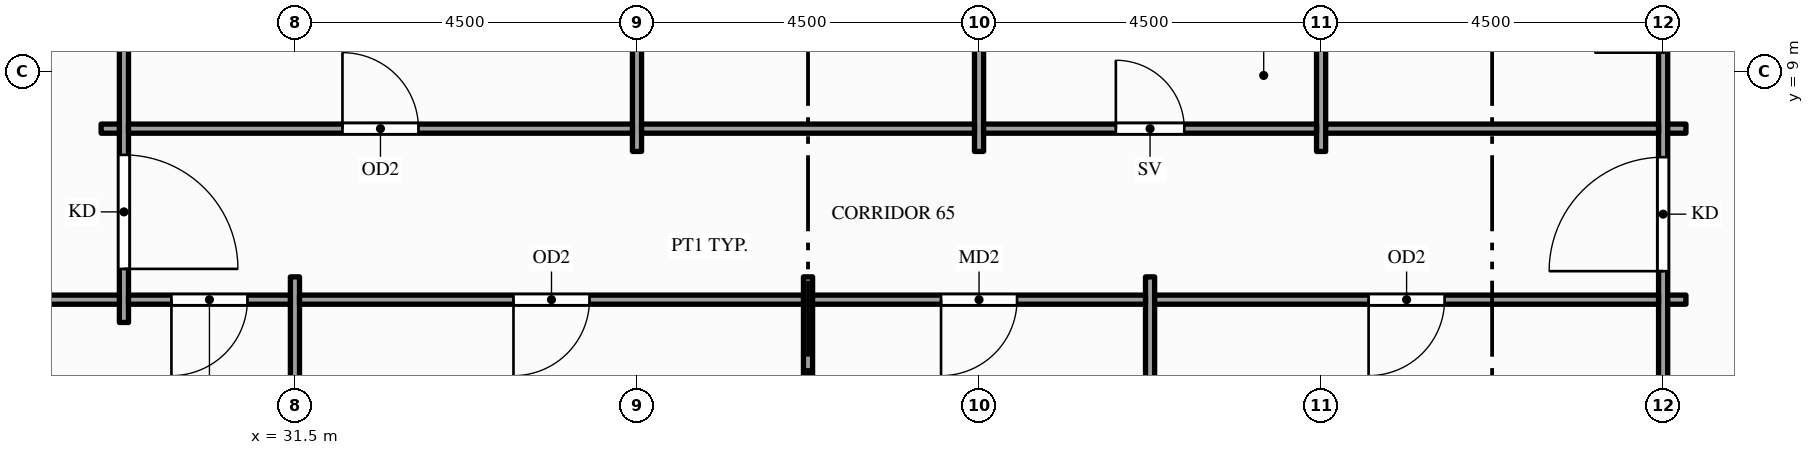
"""IFC4 building model, lengths in metres.
Left out: names, types, materials, properties, quantities, classifications, styles, units other than length and angle.
Written with IfcOpenShell. Run it as: python <this file> out.ifc"""

import sys

from ifc_helpers import new_model, si_unit, direction, frame, frame_2d, origin, place, context, subcontext, project, spatial, rectangle, extrude, element, fill, save


model = new_model("IFC4")
c1 = context("Model", 3, precision=1e-05, world=origin(), true_north=direction((0.0, 1.0)))
c2 = subcontext(c1, "Body", "Model", "MODEL_VIEW")
j1 = project(units=[si_unit("LENGTHUNIT", "METRE"), si_unit("PLANEANGLEUNIT", "RADIAN")], contexts=[c1])
p1 = place(None, origin())
s1 = spatial("IfcSite", under=j1, at=p1, CompositionType="ELEMENT")
p2 = place(p1, origin())
s2 = spatial("IfcBuilding", under=s1, at=p2, CompositionType="ELEMENT")
p3 = place(p2, frame((0.0, 0.0, 179.0)))
s3 = spatial("IfcBuildingStorey", under=s2, at=p3, CompositionType="ELEMENT", Elevation=179.0)
p4 = place(p3, frame((29.25, 5.7, 0.0), z_axis=(0.0, 0.0, 1.0), x_axis=(0.0, 1.0, 0.0)))
e1 = element("IfcWall", 1, at=p4, inside=s3, PredefinedType="PARTITIONING", context=c2, shape_type="SweptSolid", body=[
    extrude(rectangle(XDim=14.1, YDim=0.12, at=frame_2d((7.05, 0.0))), origin(), (0.0, 0.0, 1.0), 2.87),
])
p5 = place(p4, frame((0.705, 0.0, 0.0)))
e2 = element("IfcOpeningElement", 2, at=p5, cuts=e1, PredefinedType="OPENING", context=c2, shape_type="SweptSolid", body=[
    extrude(rectangle(XDim=1.5, YDim=2.1, at=frame_2d((0.75, 1.05))), frame((0.0, 0.07, 0.0), z_axis=(0.0, -1.0, 0.0), x_axis=(1.0, 0.0, 0.0)), (0.0, 0.0, 1.0), 0.14),
])
p6 = place(p4, frame((11.895, 0.0, 0.0)))
e3 = element("IfcOpeningElement", 3, at=p6, cuts=e1, PredefinedType="OPENING", context=c2, shape_type="SweptSolid", body=[
    extrude(rectangle(XDim=1.5, YDim=2.1, at=frame_2d((0.75, 1.05))), frame((0.0, 0.07, 0.0), z_axis=(0.0, -1.0, 0.0), x_axis=(1.0, 0.0, 0.0)), (0.0, 0.0, 1.0), 0.14),
])
p7 = place(p3, frame((31.5, 1.65, 0.0), z_axis=(0.0, 0.0, 1.0), x_axis=(0.0, 1.0, 0.0)))
e4 = element("IfcWall", 4, at=p7, inside=s3, PredefinedType="PARTITIONING", context=c2, shape_type="SweptSolid", body=[
    extrude(rectangle(XDim=4.65, YDim=0.12, at=frame_2d((2.325, 0.0))), origin(), (0.0, 0.0, 1.0), 2.87),
])
p8 = place(p3, frame((36.0, 7.95, 0.0), z_axis=(0.0, 0.0, 1.0), x_axis=(0.0, 1.0, 0.0)))
e5 = element("IfcWall", 5, at=p8, inside=s3, PredefinedType="PARTITIONING", context=c2, shape_type="SweptSolid", body=[
    extrude(rectangle(XDim=9.6, YDim=0.12, at=frame_2d((4.8, 0.0))), origin(), (0.0, 0.0, 1.0), 2.87),
])
p9 = place(p3, frame((38.25, 1.65, 0.0), z_axis=(0.0, 0.0, 1.0), x_axis=(0.0, 1.0, 0.0)))
e6 = element("IfcWall", 6, at=p9, inside=s3, PredefinedType="PARTITIONING", context=c2, shape_type="SweptSolid", body=[
    extrude(rectangle(XDim=4.65, YDim=0.12, at=frame_2d((2.325, 0.0))), origin(), (0.0, 0.0, 1.0), 2.87),
])
p10 = place(p3, frame((40.5, 7.95, 0.0), z_axis=(0.0, 0.0, 1.0), x_axis=(0.0, 1.0, 0.0)))
e7 = element("IfcWall", 7, at=p10, inside=s3, PredefinedType="PARTITIONING", context=c2, shape_type="SweptSolid", body=[
    extrude(rectangle(XDim=9.6, YDim=0.12, at=frame_2d((4.8, 0.0))), origin(), (0.0, 0.0, 1.0), 2.87),
])
p11 = place(p3, frame((42.75, 1.65, 0.0), z_axis=(0.0, 0.0, 1.0), x_axis=(0.0, 1.0, 0.0)))
e8 = element("IfcWall", 8, at=p11, inside=s3, PredefinedType="PARTITIONING", context=c2, shape_type="SweptSolid", body=[
    extrude(rectangle(XDim=4.65, YDim=0.12, at=frame_2d((2.325, 0.0))), origin(), (0.0, 0.0, 1.0), 2.87),
])
p12 = place(p3, frame((45.0, 7.95, 0.0), z_axis=(0.0, 0.0, 1.0), x_axis=(0.0, 1.0, 0.0)))
e9 = element("IfcWall", 9, at=p12, inside=s3, PredefinedType="PARTITIONING", context=c2, shape_type="SweptSolid", body=[
    extrude(rectangle(XDim=9.6, YDim=0.12, at=frame_2d((4.8, 0.0))), origin(), (0.0, 0.0, 1.0), 2.87),
])
p13 = place(p3, frame((49.5, 1.65, 0.0), z_axis=(0.0, 0.0, 1.0), x_axis=(0.0, 1.0, 0.0)))
e10 = element("IfcWall", 10, at=p13, inside=s3, PredefinedType="PARTITIONING", context=c2, shape_type="SweptSolid", body=[
    extrude(rectangle(XDim=22.2, YDim=0.12, at=frame_2d((11.1, 0.0))), origin(), (0.0, 0.0, 1.0), 2.87),
])
p14 = place(p13, frame((4.725, 0.0, 0.0)))
e11 = element("IfcOpeningElement", 11, at=p14, cuts=e10, PredefinedType="OPENING", context=c2, shape_type="SweptSolid", body=[
    extrude(rectangle(XDim=1.5, YDim=2.1, at=frame_2d((0.75, 1.05))), frame((0.0, 0.07, 0.0), z_axis=(0.0, -1.0, 0.0), x_axis=(1.0, 0.0, 0.0)), (0.0, 0.0, 1.0), 0.14),
])
p15 = place(p13, frame((15.975, 0.0, 0.0)))
e12 = element("IfcOpeningElement", 12, at=p15, cuts=e10, PredefinedType="OPENING", context=c2, shape_type="SweptSolid", body=[
    extrude(rectangle(XDim=1.5, YDim=2.1, at=frame_2d((0.75, 1.05))), frame((0.0, 0.07, 0.0), z_axis=(0.0, -1.0, 0.0), x_axis=(1.0, 0.0, 0.0)), (0.0, 0.0, 1.0), 0.14),
])
p16 = place(p13, frame((7.6, 0.0, 0.0)))
e13 = element("IfcOpeningElement", 13, at=p16, cuts=e10, PredefinedType="OPENING", context=c2, shape_type="SweptSolid", body=[
    extrude(rectangle(XDim=0.9, YDim=2.1, at=frame_2d((0.45, 1.05))), frame((0.0, 0.07, 0.0), z_axis=(0.0, -1.0, 0.0), x_axis=(1.0, 0.0, 0.0)), (0.0, 0.0, 1.0), 0.14),
])
p17 = place(p13, frame((10.65, 0.0, 0.0)))
e14 = element("IfcOpeningElement", 14, at=p17, cuts=e10, PredefinedType="OPENING", context=c2, shape_type="SweptSolid", body=[
    extrude(rectangle(XDim=0.9, YDim=2.1, at=frame_2d((0.45, 1.05))), frame((0.0, 0.07, 0.0), z_axis=(0.0, -1.0, 0.0), x_axis=(1.0, 0.0, 0.0)), (0.0, 0.0, 1.0), 0.14),
])
p18 = place(p13, frame((13.6, 0.0, 0.0)))
e15 = element("IfcOpeningElement", 15, at=p18, cuts=e10, PredefinedType="OPENING", context=c2, shape_type="SweptSolid", body=[
    extrude(rectangle(XDim=1.0, YDim=2.1, at=frame_2d((0.5, 1.05))), frame((0.0, 0.07, 0.0), z_axis=(0.0, -1.0, 0.0), x_axis=(1.0, 0.0, 0.0)), (0.0, 0.0, 1.0), 0.14),
])
p19 = place(p3, frame((27.06, 6.0, 0.0), z_axis=(0.0, 0.0, 1.0), x_axis=(1.0, 0.0, 0.0)))
e16 = element("IfcWall", 16, at=p19, inside=s3, PredefinedType="PARTITIONING", context=c2, shape_type="SweptSolid", body=[
    extrude(rectangle(XDim=2.13, YDim=0.12, at=frame_2d((1.065, 0.0))), origin(), (0.0, 0.0, 1.0), 2.87),
])
p20 = place(p3, frame((29.31, 6.0, 0.0), z_axis=(0.0, 0.0, 1.0), x_axis=(1.0, 0.0, 0.0)))
e17 = element("IfcWall", 17, at=p20, inside=s3, PredefinedType="PARTITIONING", context=c2, shape_type="SweptSolid", body=[
    extrude(rectangle(XDim=2.13, YDim=0.12, at=frame_2d((1.065, 0.0))), origin(), (0.0, 0.0, 1.0), 2.87),
])
p21 = place(p20, frame((0.565, 0.0, 0.0)))
e18 = element("IfcOpeningElement", 18, at=p21, cuts=e17, PredefinedType="OPENING", context=c2, shape_type="SweptSolid", body=[
    extrude(rectangle(XDim=1.0, YDim=2.1, at=frame_2d((0.5, 1.05))), frame((0.0, 0.07, 0.0), z_axis=(0.0, -1.0, 0.0), x_axis=(1.0, 0.0, 0.0)), (0.0, 0.0, 1.0), 0.14),
])
p22 = place(p3, frame((31.56, 6.0, 0.0), z_axis=(0.0, 0.0, 1.0), x_axis=(1.0, 0.0, 0.0)))
e19 = element("IfcWall", 19, at=p22, inside=s3, PredefinedType="PARTITIONING", context=c2, shape_type="SweptSolid", body=[
    extrude(rectangle(XDim=6.63, YDim=0.12, at=frame_2d((3.315, 0.0))), origin(), (0.0, 0.0, 1.0), 2.87),
])
p23 = place(p22, frame((2.815, 0.0, 0.0)))
e20 = element("IfcOpeningElement", 20, at=p23, cuts=e19, PredefinedType="OPENING", context=c2, shape_type="SweptSolid", body=[
    extrude(rectangle(XDim=1.0, YDim=2.1, at=frame_2d((0.5, 1.05))), frame((0.0, 0.07, 0.0), z_axis=(0.0, -1.0, 0.0), x_axis=(1.0, 0.0, 0.0)), (0.0, 0.0, 1.0), 0.14),
])
p24 = place(p3, frame((38.31, 6.0, 0.0), z_axis=(0.0, 0.0, 1.0), x_axis=(1.0, 0.0, 0.0)))
e21 = element("IfcWall", 21, at=p24, inside=s3, PredefinedType="PARTITIONING", context=c2, shape_type="SweptSolid", body=[
    extrude(rectangle(XDim=4.38, YDim=0.12, at=frame_2d((2.19, 0.0))), origin(), (0.0, 0.0, 1.0), 2.87),
])
p25 = place(p24, frame((1.69, 0.0, 0.0)))
e22 = element("IfcOpeningElement", 22, at=p25, cuts=e21, PredefinedType="OPENING", context=c2, shape_type="SweptSolid", body=[
    extrude(rectangle(XDim=1.0, YDim=2.1, at=frame_2d((0.5, 1.05))), frame((0.0, 0.07, 0.0), z_axis=(0.0, -1.0, 0.0), x_axis=(1.0, 0.0, 0.0)), (0.0, 0.0, 1.0), 0.14),
])
p26 = place(p3, frame((42.81, 6.0, 0.0), z_axis=(0.0, 0.0, 1.0), x_axis=(1.0, 0.0, 0.0)))
e23 = element("IfcWall", 23, at=p26, inside=s3, PredefinedType="PARTITIONING", context=c2, shape_type="SweptSolid", body=[
    extrude(rectangle(XDim=6.63, YDim=0.12, at=frame_2d((3.315, 0.0))), origin(), (0.0, 0.0, 1.0), 2.87),
])
p27 = place(p26, frame((2.815, 0.0, 0.0)))
e24 = element("IfcOpeningElement", 24, at=p27, cuts=e23, PredefinedType="OPENING", context=c2, shape_type="SweptSolid", body=[
    extrude(rectangle(XDim=1.0, YDim=2.1, at=frame_2d((0.5, 1.05))), frame((0.0, 0.07, 0.0), z_axis=(0.0, -1.0, 0.0), x_axis=(1.0, 0.0, 0.0)), (0.0, 0.0, 1.0), 0.14),
])
for number, where, z_axis, x_axis in (
    (25, (49.56, 6.0, 0.0), (0.0, 0.0, 1.0), (1.0, 0.0, 0.0)),
    (26, (28.95, 8.25, 0.0), (0.0, 0.0, 1.0), (1.0, 0.0, 0.0)),
):
    element("IfcWall", number, at=place(p3, frame(where, z_axis=z_axis, x_axis=x_axis)), inside=s3, PredefinedType="PARTITIONING", context=c2, shape_type="SweptSolid", body=[
        extrude(rectangle(XDim=0.24, YDim=0.12, at=frame_2d((0.12, 0.0))), origin(), (0.0, 0.0, 1.0), 2.87),
    ])
p28 = place(p3, frame((29.31, 8.25, 0.0), z_axis=(0.0, 0.0, 1.0), x_axis=(1.0, 0.0, 0.0)))
e27 = element("IfcWall", 27, at=p28, inside=s3, PredefinedType="PARTITIONING", context=c2, shape_type="SweptSolid", body=[
    extrude(rectangle(XDim=6.63, YDim=0.12, at=frame_2d((3.315, 0.0))), origin(), (0.0, 0.0, 1.0), 2.87),
])
p29 = place(p28, frame((2.815, 0.0, 0.0)))
e28 = element("IfcOpeningElement", 28, at=p29, cuts=e27, PredefinedType="OPENING", context=c2, shape_type="SweptSolid", body=[
    extrude(rectangle(XDim=1.0, YDim=2.1, at=frame_2d((0.5, 1.05))), frame((0.0, 0.07, 0.0), z_axis=(0.0, -1.0, 0.0), x_axis=(1.0, 0.0, 0.0)), (0.0, 0.0, 1.0), 0.14),
])
p30 = place(p3, frame((36.06, 8.25, 0.0), z_axis=(0.0, 0.0, 1.0), x_axis=(1.0, 0.0, 0.0)))
e29 = element("IfcWall", 29, at=p30, inside=s3, PredefinedType="PARTITIONING", context=c2, shape_type="SweptSolid", body=[
    extrude(rectangle(XDim=4.38, YDim=0.12, at=frame_2d((2.19, 0.0))), origin(), (0.0, 0.0, 1.0), 2.87),
])
p31 = place(p3, frame((40.56, 8.25, 0.0), z_axis=(0.0, 0.0, 1.0), x_axis=(1.0, 0.0, 0.0)))
e30 = element("IfcWall", 30, at=p31, inside=s3, PredefinedType="PARTITIONING", context=c2, shape_type="SweptSolid", body=[
    extrude(rectangle(XDim=4.38, YDim=0.12, at=frame_2d((2.19, 0.0))), origin(), (0.0, 0.0, 1.0), 2.87),
])
p32 = place(p31, frame((1.74, 0.0, 0.0)))
e31 = element("IfcOpeningElement", 31, at=p32, cuts=e30, PredefinedType="OPENING", context=c2, shape_type="SweptSolid", body=[
    extrude(rectangle(XDim=0.9, YDim=2.1, at=frame_2d((0.45, 1.05))), frame((0.0, 0.07, 0.0), z_axis=(0.0, -1.0, 0.0), x_axis=(1.0, 0.0, 0.0)), (0.0, 0.0, 1.0), 0.14),
])
p33 = place(p3, frame((45.06, 8.25, 0.0), z_axis=(0.0, 0.0, 1.0), x_axis=(1.0, 0.0, 0.0)))
e32 = element("IfcWall", 32, at=p33, inside=s3, PredefinedType="PARTITIONING", context=c2, shape_type="SweptSolid", body=[
    extrude(rectangle(XDim=4.38, YDim=0.12, at=frame_2d((2.19, 0.0))), origin(), (0.0, 0.0, 1.0), 2.87),
])
p34 = place(p3, frame((49.56, 8.25, 0.0), z_axis=(0.0, 0.0, 1.0), x_axis=(1.0, 0.0, 0.0)))
e33 = element("IfcWall", 33, at=p34, inside=s3, PredefinedType="PARTITIONING", context=c2, shape_type="SweptSolid", body=[
    extrude(rectangle(XDim=0.24, YDim=0.12, at=frame_2d((0.12, 0.0))), origin(), (0.0, 0.0, 1.0), 2.87),
])
p35 = place(p5, origin())
e34 = element("IfcDoor", 34, at=p35, inside=s3, OperationType="SINGLE_SWING_LEFT", PredefinedType="DOOR", context=c2, shape_type="SweptSolid", body=[
    extrude(rectangle(XDim=1.5, YDim=2.1, at=frame_2d((0.75, 1.05))), frame((0.0, 0.025, 0.0), z_axis=(0.0, -1.0, 0.0), x_axis=(1.0, 0.0, 0.0)), (0.0, 0.0, 1.0), 0.05),
])
fill(e2, e34)
p36 = place(p14, origin())
e35 = element("IfcDoor", 35, at=p36, inside=s3, OperationType="SINGLE_SWING_LEFT", PredefinedType="DOOR", context=c2, shape_type="SweptSolid", body=[
    extrude(rectangle(XDim=1.5, YDim=2.1, at=frame_2d((0.75, 1.05))), frame((0.0, 0.025, 0.0), z_axis=(0.0, -1.0, 0.0), x_axis=(1.0, 0.0, 0.0)), (0.0, 0.0, 1.0), 0.05),
])
fill(e11, e35)
p37 = place(p29, origin())
e36 = element("IfcDoor", 36, at=p37, inside=s3, OperationType="SINGLE_SWING_LEFT", PredefinedType="DOOR", context=c2, shape_type="SweptSolid", body=[
    extrude(rectangle(XDim=1.0, YDim=2.1, at=frame_2d((0.5, 1.05))), frame((0.0, 0.025, 0.0), z_axis=(0.0, -1.0, 0.0), x_axis=(1.0, 0.0, 0.0)), (0.0, 0.0, 1.0), 0.05),
])
fill(e28, e36)
p38 = place(p32, origin())
e37 = element("IfcDoor", 37, at=p38, inside=s3, OperationType="SINGLE_SWING_LEFT", PredefinedType="DOOR", context=c2, shape_type="SweptSolid", body=[
    extrude(rectangle(XDim=0.9, YDim=2.1, at=frame_2d((0.45, 1.05))), frame((0.0, 0.025, 0.0), z_axis=(0.0, -1.0, 0.0), x_axis=(1.0, 0.0, 0.0)), (0.0, 0.0, 1.0), 0.05),
])
fill(e31, e37)
p39 = place(p21, origin())
e38 = element("IfcDoor", 38, at=p39, inside=s3, OperationType="SINGLE_SWING_LEFT", PredefinedType="DOOR", context=c2, shape_type="SweptSolid", body=[
    extrude(rectangle(XDim=1.0, YDim=2.1, at=frame_2d((0.5, 1.05))), frame((0.0, 0.025, 0.0), z_axis=(0.0, -1.0, 0.0), x_axis=(1.0, 0.0, 0.0)), (0.0, 0.0, 1.0), 0.05),
])
fill(e18, e38)
p40 = place(p23, origin())
e39 = element("IfcDoor", 39, at=p40, inside=s3, OperationType="SINGLE_SWING_LEFT", PredefinedType="DOOR", context=c2, shape_type="SweptSolid", body=[
    extrude(rectangle(XDim=1.0, YDim=2.1, at=frame_2d((0.5, 1.05))), frame((0.0, 0.025, 0.0), z_axis=(0.0, -1.0, 0.0), x_axis=(1.0, 0.0, 0.0)), (0.0, 0.0, 1.0), 0.05),
])
fill(e20, e39)
p41 = place(p25, origin())
e40 = element("IfcDoor", 40, at=p41, inside=s3, OperationType="SINGLE_SWING_LEFT", PredefinedType="DOOR", context=c2, shape_type="SweptSolid", body=[
    extrude(rectangle(XDim=1.0, YDim=2.1, at=frame_2d((0.5, 1.05))), frame((0.0, 0.025, 0.0), z_axis=(0.0, -1.0, 0.0), x_axis=(1.0, 0.0, 0.0)), (0.0, 0.0, 1.0), 0.05),
])
fill(e22, e40)
p42 = place(p27, origin())
e41 = element("IfcDoor", 41, at=p42, inside=s3, OperationType="SINGLE_SWING_LEFT", PredefinedType="DOOR", context=c2, shape_type="SweptSolid", body=[
    extrude(rectangle(XDim=1.0, YDim=2.1, at=frame_2d((0.5, 1.05))), frame((0.0, 0.025, 0.0), z_axis=(0.0, -1.0, 0.0), x_axis=(1.0, 0.0, 0.0)), (0.0, 0.0, 1.0), 0.05),
])
fill(e24, e41)
save(model, sys.argv[1])
